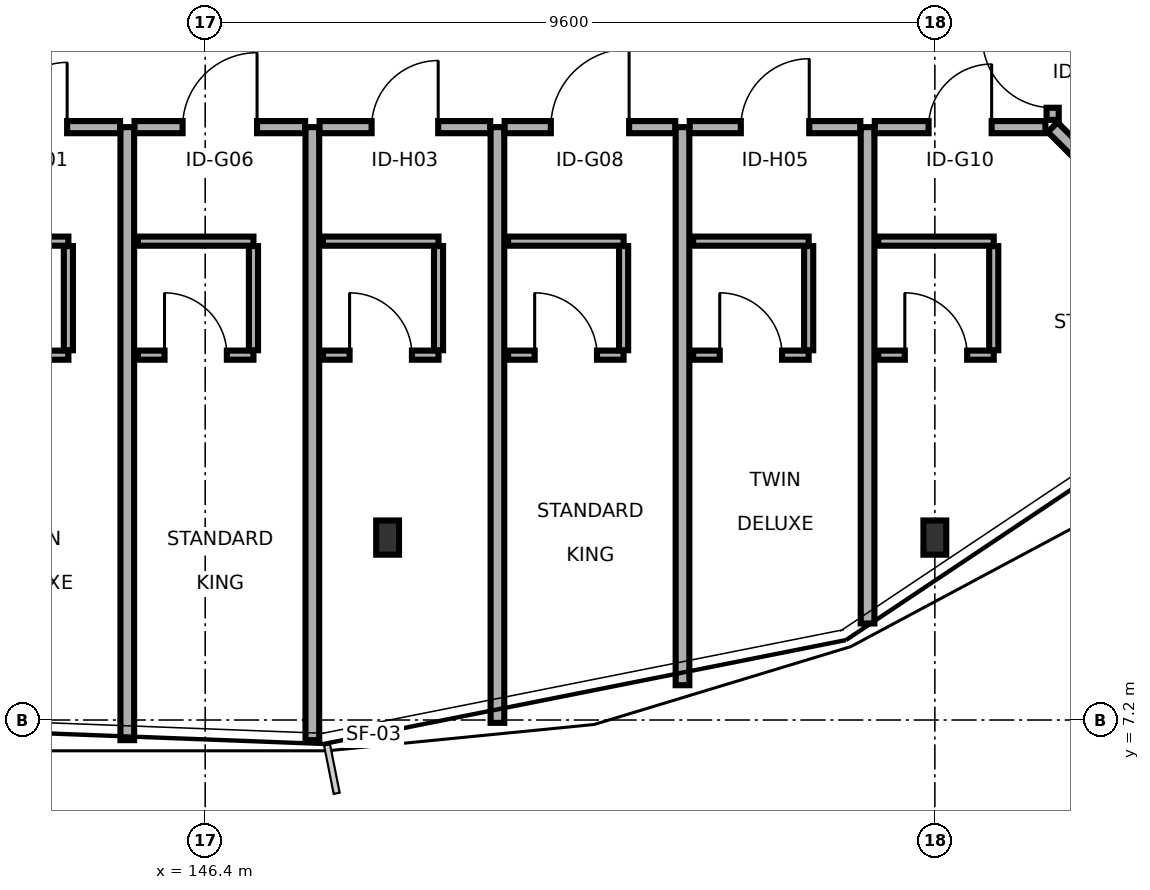
"""IFC4 building model, lengths in metres.
Left out: names, types, materials, properties, quantities, classifications, styles, units other than length and angle.
Written with IfcOpenShell. Run it as: python <this file> out.ifc"""

import sys

from ifc_helpers import new_model, si_unit, direction, frame, frame_2d, origin, origin_2d, place, context, subcontext, project, spatial, rectangle, i_section, extrude, element, fill, save


model = new_model("IFC4")
c1 = context("Model", 3, precision=1e-05, world=origin(), true_north=direction((0.0, 1.0)))
c2 = subcontext(c1, "Body", "Model", "MODEL_VIEW")
j1 = project(units=[si_unit("LENGTHUNIT", "METRE"), si_unit("PLANEANGLEUNIT", "RADIAN")], contexts=[c1])
p1 = place(None, origin())
s1 = spatial("IfcSite", under=j1, at=p1, CompositionType="ELEMENT")
p2 = place(p1, origin())
s2 = spatial("IfcBuilding", under=s1, at=p2, CompositionType="ELEMENT")
p3 = place(p2, frame((0.0, 0.0, 31.7)))
s3 = spatial("IfcBuildingStorey", under=s2, at=p3, CompositionType="ELEMENT", Elevation=31.7)
for number, where, z_axis, x_axis in (
    (1, (148.8, 9.6, 0.0), (0.0, 0.0, 1.0), (1.0, 0.0, 0.0)),
    (2, (156.0, 9.6, 0.0), (0.0, 0.0, 1.0), (1.0, 0.0, 0.0)),
):
    element("IfcColumn", number, at=place(p3, frame(where, z_axis=z_axis, x_axis=x_axis)), inside=s3, PredefinedType="COLUMN", context=c2, shape_type="SweptSolid", body=[
        extrude(i_section(OverallWidth=0.3, OverallDepth=0.45, WebThickness=0.014, FlangeThickness=0.026, FilletRadius=0.027, at=origin_2d()), origin(), (0.0, 0.0, 1.0), 3.4),
    ])
p4 = place(p3, frame((143.035, 15.0, 0.0), z_axis=(0.0, 0.0, 1.0), x_axis=(1.0, 0.0, 0.0)))
e3 = element("IfcWall", 3, at=p4, inside=s3, PredefinedType="PARTITIONING", context=c2, shape_type="SweptSolid", body=[
    extrude(rectangle(XDim=2.245, YDim=0.16, at=frame_2d((1.123, 0.0))), origin(), (0.0, 0.0, 1.0), 3.17),
])
p5 = place(p4, frame((0.697, 0.0, 0.0)))
e4 = element("IfcOpeningElement", 4, at=p5, cuts=e3, PredefinedType="OPENING", context=c2, shape_type="SweptSolid", body=[
    extrude(rectangle(XDim=0.852, YDim=2.1, at=frame_2d((0.426, 1.05))), frame((0.0, 0.09, 0.0), z_axis=(0.0, -1.0, 0.0), x_axis=(1.0, 0.0, 0.0)), (0.0, 0.0, 1.0), 0.18),
])
p6 = place(p3, frame((143.08, 12.0, 0.0), z_axis=(0.0, 0.0, 1.0), x_axis=(1.0, 0.0, 0.0)))
e5 = element("IfcWall", 5, at=p6, inside=s3, PredefinedType="PARTITIONING", context=c2, shape_type="SweptSolid", body=[
    extrude(rectangle(XDim=1.52, YDim=0.12, at=frame_2d((0.76, 0.0))), origin(), (0.0, 0.0, 1.0), 3.17),
])
p7 = place(p6, frame((0.35, 0.0, 0.0)))
e6 = element("IfcOpeningElement", 6, at=p7, cuts=e5, PredefinedType="OPENING", context=c2, shape_type="SweptSolid", body=[
    extrude(rectangle(XDim=0.82, YDim=2.08, at=frame_2d((0.41, 1.04))), frame((0.0, 0.07, 0.0), z_axis=(0.0, -1.0, 0.0), x_axis=(1.0, 0.0, 0.0)), (0.0, 0.0, 1.0), 0.14),
])
p8 = place(p3, frame((143.08, 13.5, 0.0), z_axis=(0.0, 0.0, 1.0), x_axis=(1.0, 0.0, 0.0)))
e7 = element("IfcWall", 7, at=p8, inside=s3, PredefinedType="PARTITIONING", context=c2, shape_type="SweptSolid", body=[
    extrude(rectangle(XDim=1.52, YDim=0.12, at=frame_2d((0.76, 0.0))), origin(), (0.0, 0.0, 1.0), 3.17),
])
p9 = place(p3, frame((144.6, 12.065, 0.0), z_axis=(0.0, 0.0, 1.0), x_axis=(0.0, 1.0, 0.0)))
e8 = element("IfcWall", 8, at=p9, inside=s3, PredefinedType="PARTITIONING", context=c2, shape_type="SweptSolid", body=[
    extrude(rectangle(XDim=1.37, YDim=0.12, at=frame_2d((0.685, 0.0))), origin(), (0.0, 0.0, 1.0), 3.17),
])
p10 = place(p3, frame((145.375, 6.935, 0.0), z_axis=(0.0, 0.0, 1.0), x_axis=(0.0, 1.0, 0.0)))
e9 = element("IfcWall", 9, at=p10, inside=s3, PredefinedType="PARTITIONING", context=c2, shape_type="SweptSolid", body=[
    extrude(rectangle(XDim=8.065, YDim=0.18, at=frame_2d((4.032, 0.0))), origin(), (0.0, 0.0, 1.0), 2.655),
])
p11 = place(p3, frame((145.47, 15.0, 0.0), z_axis=(0.0, 0.0, 1.0), x_axis=(1.0, 0.0, 0.0)))
e10 = element("IfcWall", 10, at=p11, inside=s3, PredefinedType="PARTITIONING", context=c2, shape_type="SweptSolid", body=[
    extrude(rectangle(XDim=2.245, YDim=0.16, at=frame_2d((1.123, 0.0))), origin(), (0.0, 0.0, 1.0), 3.17),
])
p12 = place(p11, frame((0.633, 0.0, 0.0)))
e11 = element("IfcOpeningElement", 11, at=p12, cuts=e10, PredefinedType="OPENING", context=c2, shape_type="SweptSolid", body=[
    extrude(rectangle(XDim=0.98, YDim=2.05, at=frame_2d((0.49, 1.025))), frame((0.0, 0.09, 0.0), z_axis=(0.0, -1.0, 0.0), x_axis=(1.0, 0.0, 0.0)), (0.0, 0.0, 1.0), 0.18),
])
p13 = place(p3, frame((145.515, 12.0, 0.0), z_axis=(0.0, 0.0, 1.0), x_axis=(1.0, 0.0, 0.0)))
e12 = element("IfcWall", 12, at=p13, inside=s3, PredefinedType="PARTITIONING", context=c2, shape_type="SweptSolid", body=[
    extrude(rectangle(XDim=1.52, YDim=0.12, at=frame_2d((0.76, 0.0))), origin(), (0.0, 0.0, 1.0), 3.17),
])
p14 = place(p13, frame((0.35, 0.0, 0.0)))
e13 = element("IfcOpeningElement", 13, at=p14, cuts=e12, PredefinedType="OPENING", context=c2, shape_type="SweptSolid", body=[
    extrude(rectangle(XDim=0.82, YDim=2.08, at=frame_2d((0.41, 1.04))), frame((0.0, 0.07, 0.0), z_axis=(0.0, -1.0, 0.0), x_axis=(1.0, 0.0, 0.0)), (0.0, 0.0, 1.0), 0.14),
])
p15 = place(p3, frame((145.515, 13.5, 0.0), z_axis=(0.0, 0.0, 1.0), x_axis=(1.0, 0.0, 0.0)))
e14 = element("IfcWall", 14, at=p15, inside=s3, PredefinedType="PARTITIONING", context=c2, shape_type="SweptSolid", body=[
    extrude(rectangle(XDim=1.52, YDim=0.12, at=frame_2d((0.76, 0.0))), origin(), (0.0, 0.0, 1.0), 3.17),
])
p16 = place(p3, frame((147.035, 12.065, 0.0), z_axis=(0.0, 0.0, 1.0), x_axis=(0.0, 1.0, 0.0)))
e15 = element("IfcWall", 15, at=p16, inside=s3, PredefinedType="PARTITIONING", context=c2, shape_type="SweptSolid", body=[
    extrude(rectangle(XDim=1.37, YDim=0.12, at=frame_2d((0.685, 0.0))), origin(), (0.0, 0.0, 1.0), 3.17),
])
p17 = place(p3, frame((147.81, 6.935, 0.0), z_axis=(0.0, 0.0, 1.0), x_axis=(0.0, 1.0, 0.0)))
e16 = element("IfcWall", 16, at=p17, inside=s3, PredefinedType="PARTITIONING", context=c2, shape_type="SweptSolid", body=[
    extrude(rectangle(XDim=8.065, YDim=0.18, at=frame_2d((4.032, 0.0))), origin(), (0.0, 0.0, 1.0), 2.655),
])
p18 = place(p3, frame((147.905, 15.0, 0.0), z_axis=(0.0, 0.0, 1.0), x_axis=(1.0, 0.0, 0.0)))
e17 = element("IfcWall", 17, at=p18, inside=s3, PredefinedType="PARTITIONING", context=c2, shape_type="SweptSolid", body=[
    extrude(rectangle(XDim=2.245, YDim=0.16, at=frame_2d((1.123, 0.0))), origin(), (0.0, 0.0, 1.0), 2.755),
])
p19 = place(p18, frame((0.685, 0.0, 0.0)))
e18 = element("IfcOpeningElement", 18, at=p19, cuts=e17, PredefinedType="OPENING", context=c2, shape_type="SweptSolid", body=[
    extrude(rectangle(XDim=0.876, YDim=2.16, at=frame_2d((0.438, 1.08))), frame((0.0, 0.09, 0.0), z_axis=(0.0, -1.0, 0.0), x_axis=(1.0, 0.0, 0.0)), (0.0, 0.0, 1.0), 0.18),
])
p20 = place(p3, frame((147.95, 12.0, 0.0), z_axis=(0.0, 0.0, 1.0), x_axis=(1.0, 0.0, 0.0)))
e19 = element("IfcWall", 19, at=p20, inside=s3, PredefinedType="PARTITIONING", context=c2, shape_type="SweptSolid", body=[
    extrude(rectangle(XDim=1.52, YDim=0.12, at=frame_2d((0.76, 0.0))), origin(), (0.0, 0.0, 1.0), 2.755),
])
p21 = place(p20, frame((0.35, 0.0, 0.0)))
e20 = element("IfcOpeningElement", 20, at=p21, cuts=e19, PredefinedType="OPENING", context=c2, shape_type="SweptSolid", body=[
    extrude(rectangle(XDim=0.82, YDim=2.08, at=frame_2d((0.41, 1.04))), frame((0.0, 0.07, 0.0), z_axis=(0.0, -1.0, 0.0), x_axis=(1.0, 0.0, 0.0)), (0.0, 0.0, 1.0), 0.14),
])
p22 = place(p3, frame((147.95, 13.5, 0.0), z_axis=(0.0, 0.0, 1.0), x_axis=(1.0, 0.0, 0.0)))
e21 = element("IfcWall", 21, at=p22, inside=s3, PredefinedType="PARTITIONING", context=c2, shape_type="SweptSolid", body=[
    extrude(rectangle(XDim=1.52, YDim=0.12, at=frame_2d((0.76, 0.0))), origin(), (0.0, 0.0, 1.0), 2.755),
])
p23 = place(p3, frame((149.47, 12.065, 0.0), z_axis=(0.0, 0.0, 1.0), x_axis=(0.0, 1.0, 0.0)))
e22 = element("IfcWall", 22, at=p23, inside=s3, PredefinedType="PARTITIONING", context=c2, shape_type="SweptSolid", body=[
    extrude(rectangle(XDim=1.37, YDim=0.12, at=frame_2d((0.685, 0.0))), origin(), (0.0, 0.0, 1.0), 3.17),
])
p24 = place(p3, frame((150.245, 7.163, 0.0), z_axis=(0.0, 0.0, 1.0), x_axis=(0.0, 1.0, 0.0)))
e23 = element("IfcWall", 23, at=p24, inside=s3, PredefinedType="PARTITIONING", context=c2, shape_type="SweptSolid", body=[
    extrude(rectangle(XDim=7.837, YDim=0.18, at=frame_2d((3.919, 0.0))), origin(), (0.0, 0.0, 1.0), 2.655),
])
p25 = place(p3, frame((150.34, 15.0, 0.0), z_axis=(0.0, 0.0, 1.0), x_axis=(1.0, 0.0, 0.0)))
e24 = element("IfcWall", 24, at=p25, inside=s3, PredefinedType="PARTITIONING", context=c2, shape_type="SweptSolid", body=[
    extrude(rectangle(XDim=2.245, YDim=0.16, at=frame_2d((1.123, 0.0))), origin(), (0.0, 0.0, 1.0), 3.17),
])
p26 = place(p25, frame((0.607, 0.0, 0.0)))
e25 = element("IfcOpeningElement", 25, at=p26, cuts=e24, PredefinedType="OPENING", context=c2, shape_type="SweptSolid", body=[
    extrude(rectangle(XDim=1.03, YDim=2.05, at=frame_2d((0.515, 1.025))), frame((0.0, 0.09, 0.0), z_axis=(0.0, -1.0, 0.0), x_axis=(1.0, 0.0, 0.0)), (0.0, 0.0, 1.0), 0.18),
])
p27 = place(p3, frame((150.385, 12.0, 0.0), z_axis=(0.0, 0.0, 1.0), x_axis=(1.0, 0.0, 0.0)))
e26 = element("IfcWall", 26, at=p27, inside=s3, PredefinedType="PARTITIONING", context=c2, shape_type="SweptSolid", body=[
    extrude(rectangle(XDim=1.52, YDim=0.12, at=frame_2d((0.76, 0.0))), origin(), (0.0, 0.0, 1.0), 3.17),
])
p28 = place(p27, frame((0.35, 0.0, 0.0)))
e27 = element("IfcOpeningElement", 27, at=p28, cuts=e26, PredefinedType="OPENING", context=c2, shape_type="SweptSolid", body=[
    extrude(rectangle(XDim=0.82, YDim=2.08, at=frame_2d((0.41, 1.04))), frame((0.0, 0.07, 0.0), z_axis=(0.0, -1.0, 0.0), x_axis=(1.0, 0.0, 0.0)), (0.0, 0.0, 1.0), 0.14),
])
p29 = place(p3, frame((150.385, 13.5, 0.0), z_axis=(0.0, 0.0, 1.0), x_axis=(1.0, 0.0, 0.0)))
e28 = element("IfcWall", 28, at=p29, inside=s3, PredefinedType="PARTITIONING", context=c2, shape_type="SweptSolid", body=[
    extrude(rectangle(XDim=1.52, YDim=0.12, at=frame_2d((0.76, 0.0))), origin(), (0.0, 0.0, 1.0), 3.17),
])
p30 = place(p3, frame((151.905, 12.065, 0.0), z_axis=(0.0, 0.0, 1.0), x_axis=(0.0, 1.0, 0.0)))
e29 = element("IfcWall", 29, at=p30, inside=s3, PredefinedType="PARTITIONING", context=c2, shape_type="SweptSolid", body=[
    extrude(rectangle(XDim=1.37, YDim=0.12, at=frame_2d((0.685, 0.0))), origin(), (0.0, 0.0, 1.0), 3.17),
])
p31 = place(p3, frame((152.68, 7.658, 0.0), z_axis=(0.0, 0.0, 1.0), x_axis=(0.0, 1.0, 0.0)))
e30 = element("IfcWall", 30, at=p31, inside=s3, PredefinedType="PARTITIONING", context=c2, shape_type="SweptSolid", body=[
    extrude(rectangle(XDim=7.342, YDim=0.18, at=frame_2d((3.671, 0.0))), origin(), (0.0, 0.0, 1.0), 2.655),
])
p32 = place(p3, frame((152.775, 15.0, 0.0), z_axis=(0.0, 0.0, 1.0), x_axis=(1.0, 0.0, 0.0)))
e31 = element("IfcWall", 31, at=p32, inside=s3, PredefinedType="PARTITIONING", context=c2, shape_type="SweptSolid", body=[
    extrude(rectangle(XDim=2.245, YDim=0.16, at=frame_2d((1.123, 0.0))), origin(), (0.0, 0.0, 1.0), 3.17),
])
p33 = place(p32, frame((0.673, 0.0, 0.0)))
e32 = element("IfcOpeningElement", 32, at=p33, cuts=e31, PredefinedType="OPENING", context=c2, shape_type="SweptSolid", body=[
    extrude(rectangle(XDim=0.9, YDim=2.1, at=frame_2d((0.45, 1.05))), frame((0.0, 0.09, 0.0), z_axis=(0.0, -1.0, 0.0), x_axis=(1.0, 0.0, 0.0)), (0.0, 0.0, 1.0), 0.18),
])
p34 = place(p3, frame((152.82, 12.0, 0.0), z_axis=(0.0, 0.0, 1.0), x_axis=(1.0, 0.0, 0.0)))
e33 = element("IfcWall", 33, at=p34, inside=s3, PredefinedType="PARTITIONING", context=c2, shape_type="SweptSolid", body=[
    extrude(rectangle(XDim=1.52, YDim=0.12, at=frame_2d((0.76, 0.0))), origin(), (0.0, 0.0, 1.0), 3.17),
])
p35 = place(p34, frame((0.35, 0.0, 0.0)))
e34 = element("IfcOpeningElement", 34, at=p35, cuts=e33, PredefinedType="OPENING", context=c2, shape_type="SweptSolid", body=[
    extrude(rectangle(XDim=0.82, YDim=2.08, at=frame_2d((0.41, 1.04))), frame((0.0, 0.07, 0.0), z_axis=(0.0, -1.0, 0.0), x_axis=(1.0, 0.0, 0.0)), (0.0, 0.0, 1.0), 0.14),
])
p36 = place(p3, frame((152.82, 13.5, 0.0), z_axis=(0.0, 0.0, 1.0), x_axis=(1.0, 0.0, 0.0)))
e35 = element("IfcWall", 35, at=p36, inside=s3, PredefinedType="PARTITIONING", context=c2, shape_type="SweptSolid", body=[
    extrude(rectangle(XDim=1.52, YDim=0.12, at=frame_2d((0.76, 0.0))), origin(), (0.0, 0.0, 1.0), 3.17),
])
p37 = place(p3, frame((154.34, 12.065, 0.0), z_axis=(0.0, 0.0, 1.0), x_axis=(0.0, 1.0, 0.0)))
e36 = element("IfcWall", 36, at=p37, inside=s3, PredefinedType="PARTITIONING", context=c2, shape_type="SweptSolid", body=[
    extrude(rectangle(XDim=1.37, YDim=0.12, at=frame_2d((0.685, 0.0))), origin(), (0.0, 0.0, 1.0), 3.17),
])
p38 = place(p3, frame((155.115, 8.47, 0.0), z_axis=(0.0, 0.0, 1.0), x_axis=(0.0, 1.0, 0.0)))
e37 = element("IfcWall", 37, at=p38, inside=s3, PredefinedType="PARTITIONING", context=c2, shape_type="SweptSolid", body=[
    extrude(rectangle(XDim=6.53, YDim=0.18, at=frame_2d((3.265, 0.0))), origin(), (0.0, 0.0, 1.0), 2.655),
])
p39 = place(p3, frame((155.21, 15.0, 0.0), z_axis=(0.0, 0.0, 1.0), x_axis=(1.0, 0.0, 0.0)))
e38 = element("IfcWall", 38, at=p39, inside=s3, PredefinedType="PARTITIONING", context=c2, shape_type="SweptSolid", body=[
    extrude(rectangle(XDim=2.245, YDim=0.16, at=frame_2d((1.123, 0.0))), origin(), (0.0, 0.0, 1.0), 2.755),
])
p40 = place(p39, frame((0.708, 0.0, 0.0)))
e39 = element("IfcOpeningElement", 39, at=p40, cuts=e38, PredefinedType="OPENING", context=c2, shape_type="SweptSolid", body=[
    extrude(rectangle(XDim=0.83, YDim=2.11, at=frame_2d((0.415, 1.055))), frame((0.0, 0.09, 0.0), z_axis=(0.0, -1.0, 0.0), x_axis=(1.0, 0.0, 0.0)), (0.0, 0.0, 1.0), 0.18),
])
p41 = place(p3, frame((155.255, 12.0, 0.0), z_axis=(0.0, 0.0, 1.0), x_axis=(1.0, 0.0, 0.0)))
e40 = element("IfcWall", 40, at=p41, inside=s3, PredefinedType="PARTITIONING", context=c2, shape_type="SweptSolid", body=[
    extrude(rectangle(XDim=1.52, YDim=0.12, at=frame_2d((0.76, 0.0))), origin(), (0.0, 0.0, 1.0), 2.755),
])
p42 = place(p41, frame((0.35, 0.0, 0.0)))
e41 = element("IfcOpeningElement", 41, at=p42, cuts=e40, PredefinedType="OPENING", context=c2, shape_type="SweptSolid", body=[
    extrude(rectangle(XDim=0.82, YDim=2.08, at=frame_2d((0.41, 1.04))), frame((0.0, 0.07, 0.0), z_axis=(0.0, -1.0, 0.0), x_axis=(1.0, 0.0, 0.0)), (0.0, 0.0, 1.0), 0.14),
])
p43 = place(p3, frame((155.255, 13.5, 0.0), z_axis=(0.0, 0.0, 1.0), x_axis=(1.0, 0.0, 0.0)))
e42 = element("IfcWall", 42, at=p43, inside=s3, PredefinedType="PARTITIONING", context=c2, shape_type="SweptSolid", body=[
    extrude(rectangle(XDim=1.52, YDim=0.12, at=frame_2d((0.76, 0.0))), origin(), (0.0, 0.0, 1.0), 2.755),
])
p44 = place(p3, frame((156.775, 12.065, 0.0), z_axis=(0.0, 0.0, 1.0), x_axis=(0.0, 1.0, 0.0)))
e43 = element("IfcWall", 43, at=p44, inside=s3, PredefinedType="PARTITIONING", context=c2, shape_type="SweptSolid", body=[
    extrude(rectangle(XDim=1.37, YDim=0.12, at=frame_2d((0.685, 0.0))), origin(), (0.0, 0.0, 1.0), 3.17),
])
p45 = place(p3, frame((157.55, 15.0, 0.0), z_axis=(0.0, 0.0, 1.0), x_axis=(0.707106781187, -0.707106781187, 0.0)))
e44 = element("IfcWall", 44, at=p45, inside=s3, PredefinedType="PARTITIONING", context=c2, shape_type="SweptSolid", body=[
    extrude(rectangle(XDim=4.138, YDim=0.18, at=frame_2d((2.069, 0.0))), origin(), (0.0, 0.0, 1.0), 2.655),
])
p46 = place(p3, frame((157.55, 15.095, 0.0), z_axis=(0.0, 0.0, 1.0), x_axis=(0.0, 1.0, 0.0)))
e45 = element("IfcWall", 45, at=p46, inside=s3, PredefinedType="PARTITIONING", context=c2, shape_type="SweptSolid", body=[
    extrude(rectangle(XDim=2.33, YDim=0.16, at=frame_2d((1.165, 0.0))), origin(), (0.0, 0.0, 1.0), 2.755),
])
p47 = place(p46, frame((0.16, 0.0, 0.0)))
e46 = element("IfcOpeningElement", 46, at=p47, cuts=e45, PredefinedType="OPENING", context=c2, shape_type="SweptSolid", body=[
    extrude(rectangle(XDim=0.924, YDim=2.16, at=frame_2d((0.462, 1.08))), frame((0.0, 0.09, 0.0), z_axis=(0.0, -1.0, 0.0), x_axis=(1.0, 0.0, 0.0)), (0.0, 0.0, 1.0), 0.18),
])
p48 = place(p5, origin())
e47 = element("IfcDoor", 47, at=p48, inside=s3, OperationType="SINGLE_SWING_RIGHT", PredefinedType="DOOR", context=c2, shape_type="SweptSolid", body=[
    extrude(rectangle(XDim=0.852, YDim=2.1, at=frame_2d((0.426, 1.05))), frame((0.0, 0.025, 0.0), z_axis=(0.0, -1.0, 0.0), x_axis=(1.0, 0.0, 0.0)), (0.0, 0.0, 1.0), 0.05),
])
fill(e4, e47)
p49 = place(p12, origin())
e48 = element("IfcDoor", 48, at=p49, inside=s3, OperationType="SINGLE_SWING_RIGHT", PredefinedType="DOOR", context=c2, shape_type="SweptSolid", body=[
    extrude(rectangle(XDim=0.98, YDim=2.05, at=frame_2d((0.49, 1.025))), frame((0.0, 0.025, 0.0), z_axis=(0.0, -1.0, 0.0), x_axis=(1.0, 0.0, 0.0)), (0.0, 0.0, 1.0), 0.05),
])
fill(e11, e48)
p50 = place(p14, origin())
e49 = element("IfcDoor", 49, at=p50, inside=s3, OperationType="SINGLE_SWING_LEFT", PredefinedType="DOOR", context=c2, shape_type="SweptSolid", body=[
    extrude(rectangle(XDim=0.82, YDim=2.08, at=frame_2d((0.41, 1.04))), frame((0.0, 0.025, 0.0), z_axis=(0.0, -1.0, 0.0), x_axis=(1.0, 0.0, 0.0)), (0.0, 0.0, 1.0), 0.05),
])
fill(e13, e49)
p51 = place(p19, origin())
e50 = element("IfcDoor", 50, at=p51, inside=s3, OperationType="SINGLE_SWING_RIGHT", PredefinedType="DOOR", context=c2, shape_type="SweptSolid", body=[
    extrude(rectangle(XDim=0.876, YDim=2.16, at=frame_2d((0.438, 1.08))), frame((0.0, 0.025, 0.0), z_axis=(0.0, -1.0, 0.0), x_axis=(1.0, 0.0, 0.0)), (0.0, 0.0, 1.0), 0.05),
])
fill(e18, e50)
p52 = place(p21, origin())
e51 = element("IfcDoor", 51, at=p52, inside=s3, OperationType="SINGLE_SWING_LEFT", PredefinedType="DOOR", context=c2, shape_type="SweptSolid", body=[
    extrude(rectangle(XDim=0.82, YDim=2.08, at=frame_2d((0.41, 1.04))), frame((0.0, 0.025, 0.0), z_axis=(0.0, -1.0, 0.0), x_axis=(1.0, 0.0, 0.0)), (0.0, 0.0, 1.0), 0.05),
])
fill(e20, e51)
p53 = place(p26, origin())
e52 = element("IfcDoor", 52, at=p53, inside=s3, OperationType="SINGLE_SWING_RIGHT", PredefinedType="DOOR", context=c2, shape_type="SweptSolid", body=[
    extrude(rectangle(XDim=1.03, YDim=2.05, at=frame_2d((0.515, 1.025))), frame((0.0, 0.025, 0.0), z_axis=(0.0, -1.0, 0.0), x_axis=(1.0, 0.0, 0.0)), (0.0, 0.0, 1.0), 0.05),
])
fill(e25, e52)
p54 = place(p28, origin())
e53 = element("IfcDoor", 53, at=p54, inside=s3, OperationType="SINGLE_SWING_LEFT", PredefinedType="DOOR", context=c2, shape_type="SweptSolid", body=[
    extrude(rectangle(XDim=0.82, YDim=2.08, at=frame_2d((0.41, 1.04))), frame((0.0, 0.025, 0.0), z_axis=(0.0, -1.0, 0.0), x_axis=(1.0, 0.0, 0.0)), (0.0, 0.0, 1.0), 0.05),
])
fill(e27, e53)
p55 = place(p33, origin())
e54 = element("IfcDoor", 54, at=p55, inside=s3, OperationType="SINGLE_SWING_RIGHT", PredefinedType="DOOR", context=c2, shape_type="SweptSolid", body=[
    extrude(rectangle(XDim=0.9, YDim=2.1, at=frame_2d((0.45, 1.05))), frame((0.0, 0.025, 0.0), z_axis=(0.0, -1.0, 0.0), x_axis=(1.0, 0.0, 0.0)), (0.0, 0.0, 1.0), 0.05),
])
fill(e32, e54)
p56 = place(p35, origin())
e55 = element("IfcDoor", 55, at=p56, inside=s3, OperationType="SINGLE_SWING_LEFT", PredefinedType="DOOR", context=c2, shape_type="SweptSolid", body=[
    extrude(rectangle(XDim=0.82, YDim=2.08, at=frame_2d((0.41, 1.04))), frame((0.0, 0.025, 0.0), z_axis=(0.0, -1.0, 0.0), x_axis=(1.0, 0.0, 0.0)), (0.0, 0.0, 1.0), 0.05),
])
fill(e34, e55)
p57 = place(p40, origin())
e56 = element("IfcDoor", 56, at=p57, inside=s3, OperationType="SINGLE_SWING_RIGHT", PredefinedType="DOOR", context=c2, shape_type="SweptSolid", body=[
    extrude(rectangle(XDim=0.83, YDim=2.11, at=frame_2d((0.415, 1.055))), frame((0.0, 0.025, 0.0), z_axis=(0.0, -1.0, 0.0), x_axis=(1.0, 0.0, 0.0)), (0.0, 0.0, 1.0), 0.05),
])
fill(e39, e56)
p58 = place(p42, origin())
e57 = element("IfcDoor", 57, at=p58, inside=s3, OperationType="SINGLE_SWING_LEFT", PredefinedType="DOOR", context=c2, shape_type="SweptSolid", body=[
    extrude(rectangle(XDim=0.82, YDim=2.08, at=frame_2d((0.41, 1.04))), frame((0.0, 0.025, 0.0), z_axis=(0.0, -1.0, 0.0), x_axis=(1.0, 0.0, 0.0)), (0.0, 0.0, 1.0), 0.05),
])
fill(e41, e57)
p59 = place(p47, origin())
e58 = element("IfcDoor", 58, at=p59, inside=s3, OperationType="SINGLE_SWING_RIGHT", PredefinedType="DOOR", context=c2, shape_type="SweptSolid", body=[
    extrude(rectangle(XDim=0.924, YDim=2.16, at=frame_2d((0.462, 1.08))), frame((0.0, 0.025, 0.0), z_axis=(0.0, -1.0, 0.0), x_axis=(1.0, 0.0, 0.0)), (0.0, 0.0, 1.0), 0.05),
])
fill(e46, e58)
save(model, sys.argv[1])
